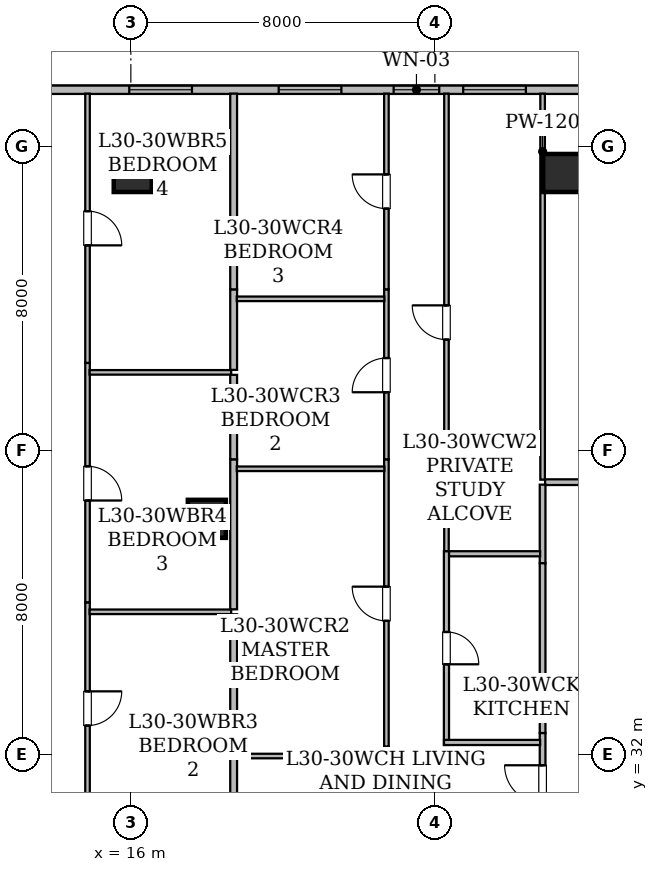
"""IFC4 building model, lengths in metres.
Left out: names, types, materials, properties, quantities, classifications, styles, units other than length and angle.
Written with IfcOpenShell. Run it as: python <this file> out.ifc"""

import sys

from ifc_helpers import new_model, si_unit, direction, frame, frame_2d, origin, origin_2d, place, context, subcontext, project, spatial, rectangle, hollow_rectangle, extrude, element, fill, save


model = new_model("IFC4")
c1 = context("Model", 3, precision=1e-05, world=origin(), true_north=direction((0.0, 1.0)))
c2 = subcontext(c1, "Body", "Model", "MODEL_VIEW")
j1 = project(units=[si_unit("LENGTHUNIT", "METRE"), si_unit("PLANEANGLEUNIT", "RADIAN")], contexts=[c1])
p1 = place(None, origin())
s1 = spatial("IfcSite", under=j1, at=p1, CompositionType="ELEMENT")
p2 = place(p1, origin())
s2 = spatial("IfcBuilding", under=s1, at=p2, CompositionType="ELEMENT")
p3 = place(p2, frame((0.0, 0.0, 120.15)))
s3 = spatial("IfcBuildingStorey", under=s2, at=p3, CompositionType="ELEMENT", Elevation=120.15)
for number, where, z_axis, x_axis in (
    (1, (16.05, 47.3, 0.0), (0.0, 0.0, 1.0), (1.0, 0.0, 0.0)),
    (2, (27.35, 47.3, 0.0), (0.0, 0.0, 1.0), (1.0, 0.0, 0.0)),
    (3, (18.0, 38.2, 0.0), (0.0, 0.0, 1.0), (1.0, 0.0, 0.0)),
):
    element("IfcColumn", number, at=place(p3, frame(where, z_axis=z_axis, x_axis=x_axis)), inside=s3, PredefinedType="COLUMN", context=c2, shape_type="SweptSolid", body=[
        extrude(hollow_rectangle(XDim=1.0, YDim=1.0, WallThickness=0.05, at=origin_2d()), origin(), (0.0, 0.0, 1.0), 3.65),
    ])
p4 = place(p3, frame((13.715, 49.49, 0.0), z_axis=(0.0, 0.0, 1.0), x_axis=(1.0, 0.0, 0.0)))
e4 = element("IfcWall", 4, at=p4, inside=s3, PredefinedType="STANDARD", context=c2, shape_type="SweptSolid", body=[
    extrude(rectangle(XDim=38.639, YDim=0.22, at=frame_2d((19.319, 0.0))), origin(), (0.0, 0.0, 1.0), 3.43),
])
p5 = place(p4, frame((16.16, 0.0, 0.85)))
e5 = element("IfcOpeningElement", 5, at=p5, cuts=e4, PredefinedType="OPENING", context=c2, shape_type="SweptSolid", body=[
    extrude(rectangle(XDim=1.65, YDim=1.55, at=frame_2d((0.825, 0.775))), frame((0.0, 0.12, 0.0), z_axis=(0.0, -1.0, 0.0), x_axis=(1.0, 0.0, 0.0)), (0.0, 0.0, 1.0), 0.24),
])
p6 = place(p4, frame((2.243, 0.0, 0.85)))
e6 = element("IfcOpeningElement", 6, at=p6, cuts=e4, PredefinedType="OPENING", context=c2, shape_type="SweptSolid", body=[
    extrude(rectangle(XDim=1.65, YDim=1.55, at=frame_2d((0.825, 0.775))), frame((0.0, 0.12, 0.0), z_axis=(0.0, -1.0, 0.0), x_axis=(1.0, 0.0, 0.0)), (0.0, 0.0, 1.0), 0.24),
])
p7 = place(p4, frame((11.03, 0.0, 0.85)))
e7 = element("IfcOpeningElement", 7, at=p7, cuts=e4, PredefinedType="OPENING", context=c2, shape_type="SweptSolid", body=[
    extrude(rectangle(XDim=1.65, YDim=1.55, at=frame_2d((0.825, 0.775))), frame((0.0, 0.12, 0.0), z_axis=(0.0, -1.0, 0.0), x_axis=(1.0, 0.0, 0.0)), (0.0, 0.0, 1.0), 0.24),
])
p8 = place(p4, frame((9.2, 0.0, 0.8)))
e8 = element("IfcOpeningElement", 8, at=p8, cuts=e4, PredefinedType="OPENING", context=c2, shape_type="SweptSolid", body=[
    extrude(rectangle(XDim=1.2, YDim=1.5, at=frame_2d((0.6, 0.75))), frame((0.0, 0.12, 0.0), z_axis=(0.0, -1.0, 0.0), x_axis=(1.0, 0.0, 0.0)), (0.0, 0.0, 1.0), 0.24),
])
p9 = place(p4, frame((6.175, 0.0, 0.85)))
e9 = element("IfcOpeningElement", 9, at=p9, cuts=e4, PredefinedType="OPENING", context=c2, shape_type="SweptSolid", body=[
    extrude(rectangle(XDim=1.65, YDim=1.55, at=frame_2d((0.825, 0.775))), frame((0.0, 0.12, 0.0), z_axis=(0.0, -1.0, 0.0), x_axis=(1.0, 0.0, 0.0)), (0.0, 0.0, 1.0), 0.24),
])
p10 = place(p4, frame((23.425, 0.0, 0.85)))
e10 = element("IfcOpeningElement", 10, at=p10, cuts=e4, PredefinedType="OPENING", context=c2, shape_type="SweptSolid", body=[
    extrude(rectangle(XDim=1.65, YDim=1.55, at=frame_2d((0.825, 0.775))), frame((0.0, 0.12, 0.0), z_axis=(0.0, -1.0, 0.0), x_axis=(1.0, 0.0, 0.0)), (0.0, 0.0, 1.0), 0.24),
])
p11 = place(p4, frame((30.23, 0.0, 0.85)))
e11 = element("IfcOpeningElement", 11, at=p11, cuts=e4, PredefinedType="OPENING", context=c2, shape_type="SweptSolid", body=[
    extrude(rectangle(XDim=1.65, YDim=1.55, at=frame_2d((0.825, 0.775))), frame((0.0, 0.12, 0.0), z_axis=(0.0, -1.0, 0.0), x_axis=(1.0, 0.0, 0.0)), (0.0, 0.0, 1.0), 0.24),
])
p12 = place(p4, frame((36.367, 0.0, 0.85)))
e12 = element("IfcOpeningElement", 12, at=p12, cuts=e4, PredefinedType="OPENING", context=c2, shape_type="SweptSolid", body=[
    extrude(rectangle(XDim=1.65, YDim=1.55, at=frame_2d((0.825, 0.775))), frame((0.0, 0.12, 0.0), z_axis=(0.0, -1.0, 0.0), x_axis=(1.0, 0.0, 0.0)), (0.0, 0.0, 1.0), 0.24),
])
p13 = place(p3, frame((26.9, 39.165, 0.0), z_axis=(0.0, 0.0, 1.0), x_axis=(1.0, 0.0, 0.0)))
e13 = element("IfcWall", 13, at=p13, inside=s3, PredefinedType="STANDARD", context=c2, shape_type="SweptSolid", body=[
    extrude(rectangle(XDim=7.914, YDim=0.15, at=frame_2d((3.957, 0.0))), origin(), (0.0, 0.0, 1.0), 2.647),
])
p14 = place(p13, frame((3.486, 0.0, 0.0)))
e14 = element("IfcOpeningElement", 14, at=p14, cuts=e13, PredefinedType="OPENING", context=c2, shape_type="SweptSolid", body=[
    extrude(rectangle(XDim=0.9, YDim=2.1, at=frame_2d((0.45, 1.05))), frame((0.0, 0.085, 0.0), z_axis=(0.0, -1.0, 0.0), x_axis=(1.0, 0.0, 0.0)), (0.0, 0.0, 1.0), 0.17),
])
p15 = place(p3, frame((26.835, 37.032, 0.0), z_axis=(0.0, 0.0, 1.0), x_axis=(0.0, 1.0, 0.0)))
e15 = element("IfcWall", 15, at=p15, inside=s3, PredefinedType="STANDARD", context=c2, shape_type="SweptSolid", body=[
    extrude(rectangle(XDim=2.068, YDim=0.15, at=frame_2d((1.034, 0.0))), origin(), (0.0, 0.0, 1.0), 2.647),
])
p16 = place(p3, frame((26.835, 29.867, 0.0), z_axis=(0.0, 0.0, 1.0), x_axis=(0.0, 1.0, 0.0)))
e16 = element("IfcWall", 16, at=p16, inside=s3, PredefinedType="STANDARD", context=c2, shape_type="SweptSolid", body=[
    extrude(rectangle(XDim=2.698, YDim=0.15, at=frame_2d((1.349, 0.0))), origin(), (0.0, 0.0, 1.0), 3.43),
])
p17 = place(p16, frame((0.849, 0.0, 0.0)))
e17 = element("IfcOpeningElement", 17, at=p17, cuts=e16, PredefinedType="OPENING", context=c2, shape_type="SweptSolid", body=[
    extrude(rectangle(XDim=1.0, YDim=2.15, at=frame_2d((0.5, 1.075))), frame((0.0, 0.085, 0.0), z_axis=(0.0, -1.0, 0.0), x_axis=(1.0, 0.0, 0.0)), (0.0, 0.0, 1.0), 0.17),
])
p18 = place(p3, frame((26.835, 32.565, 0.0), z_axis=(0.0, 0.0, 1.0), x_axis=(0.0, 1.0, 0.0)))
e18 = element("IfcWall", 18, at=p18, inside=s3, PredefinedType="STANDARD", context=c2, shape_type="SweptSolid", body=[
    extrude(rectangle(XDim=4.467, YDim=0.15, at=frame_2d((2.233, 0.0))), origin(), (0.0, 0.0, 1.0), 2.647),
])
p19 = place(p3, frame((26.835, 39.23, 0.0), z_axis=(0.0, 0.0, 1.0), x_axis=(0.0, 1.0, 0.0)))
e19 = element("IfcWall", 19, at=p19, inside=s3, PredefinedType="PARTITIONING", context=c2, shape_type="SweptSolid", body=[
    extrude(rectangle(XDim=10.158, YDim=0.12, at=frame_2d((5.079, 0.0))), origin(), (0.0, 0.0, 1.0), 2.876),
])
p20 = place(p3, frame((14.86, 36.003, 0.0), z_axis=(0.0, 0.0, 1.0), x_axis=(0.0, -1.0, 0.0)))
e20 = element("IfcWall", 20, at=p20, inside=s3, PredefinedType="PARTITIONING", context=c2, shape_type="SweptSolid", body=[
    extrude(rectangle(XDim=5.543, YDim=0.12, at=frame_2d((2.771, 0.0))), origin(), (0.0, 0.0, 1.0), 2.687),
])
p21 = place(p20, frame((2.342, 0.0, 0.0)))
e21 = element("IfcOpeningElement", 21, at=p21, cuts=e20, PredefinedType="OPENING", context=c2, shape_type="SweptSolid", body=[
    extrude(rectangle(XDim=0.9, YDim=2.1, at=frame_2d((0.45, 1.05))), frame((0.0, 0.07, 0.0), z_axis=(0.0, -1.0, 0.0), x_axis=(1.0, 0.0, 0.0)), (0.0, 0.0, 1.0), 0.14),
])
p22 = place(p3, frame((14.86, 42.303, 0.0), z_axis=(0.0, 0.0, 1.0), x_axis=(0.0, -1.0, 0.0)))
e22 = element("IfcWall", 22, at=p22, inside=s3, PredefinedType="PARTITIONING", context=c2, shape_type="SweptSolid", body=[
    extrude(rectangle(XDim=6.3, YDim=0.12, at=frame_2d((3.15, 0.0))), origin(), (0.0, 0.0, 1.0), 2.687),
])
p23 = place(p22, frame((2.721, 0.0, 0.0)))
e23 = element("IfcOpeningElement", 23, at=p23, cuts=e22, PredefinedType="OPENING", context=c2, shape_type="SweptSolid", body=[
    extrude(rectangle(XDim=0.9, YDim=2.1, at=frame_2d((0.45, 1.05))), frame((0.0, 0.07, 0.0), z_axis=(0.0, -1.0, 0.0), x_axis=(1.0, 0.0, 0.0)), (0.0, 0.0, 1.0), 0.14),
])
p24 = place(p3, frame((14.86, 49.388, 0.0), z_axis=(0.0, 0.0, 1.0), x_axis=(0.0, -1.0, 0.0)))
e24 = element("IfcWall", 24, at=p24, inside=s3, PredefinedType="PARTITIONING", context=c2, shape_type="SweptSolid", body=[
    extrude(rectangle(XDim=7.085, YDim=0.12, at=frame_2d((3.542, 0.0))), origin(), (0.0, 0.0, 1.0), 2.876),
])
p25 = place(p24, frame((3.092, 0.0, 0.0)))
e25 = element("IfcOpeningElement", 25, at=p25, cuts=e24, PredefinedType="OPENING", context=c2, shape_type="SweptSolid", body=[
    extrude(rectangle(XDim=0.9, YDim=2.1, at=frame_2d((0.45, 1.05))), frame((0.0, 0.07, 0.0), z_axis=(0.0, -1.0, 0.0), x_axis=(1.0, 0.0, 0.0)), (0.0, 0.0, 1.0), 0.14),
])
p26 = place(p3, frame((14.914, 35.754, 0.0), z_axis=(0.0, 0.0, 1.0), x_axis=(1.0, 0.0, 0.0)))
e26 = element("IfcWall", 26, at=p26, inside=s3, PredefinedType="PARTITIONING", context=c2, shape_type="SweptSolid", body=[
    extrude(rectangle(XDim=3.726, YDim=0.12, at=frame_2d((1.863, 0.0))), origin(), (0.0, 0.0, 1.0), 2.647),
])
p27 = place(p3, frame((18.705, 32.208, 0.0), z_axis=(0.0, 0.0, 1.0), x_axis=(0.0, -1.0, 0.0)))
e27 = element("IfcWall", 27, at=p27, inside=s3, PredefinedType="STANDARD", context=c2, shape_type="SweptSolid", body=[
    extrude(rectangle(XDim=1.618, YDim=0.18, at=frame_2d((0.809, 0.0))), origin(), (0.0, 0.0, 1.0), 3.43),
])
p28 = place(p3, frame((18.705, 35.689, 0.0), z_axis=(0.0, 0.0, 1.0), x_axis=(0.0, -1.0, 0.0)))
e28 = element("IfcWall", 28, at=p28, inside=s3, PredefinedType="STANDARD", context=c2, shape_type="SweptSolid", body=[
    extrude(rectangle(XDim=3.481, YDim=0.18, at=frame_2d((1.74, 0.0))), origin(), (0.0, 0.0, 1.0), 3.43),
])
p29 = place(p3, frame((14.914, 42.054, 0.0), z_axis=(0.0, 0.0, 1.0), x_axis=(1.0, 0.0, 0.0)))
e29 = element("IfcWall", 29, at=p29, inside=s3, PredefinedType="PARTITIONING", context=c2, shape_type="SweptSolid", body=[
    extrude(rectangle(XDim=3.726, YDim=0.12, at=frame_2d((1.863, 0.0))), origin(), (0.0, 0.0, 1.0), 2.647),
])
p30 = place(p3, frame((18.705, 39.766, 0.0), z_axis=(0.0, 0.0, 1.0), x_axis=(0.0, -1.0, 0.0)))
e30 = element("IfcWall", 30, at=p30, inside=s3, PredefinedType="STANDARD", context=c2, shape_type="SweptSolid", body=[
    extrude(rectangle(XDim=3.947, YDim=0.18, at=frame_2d((1.974, 0.0))), origin(), (0.0, 0.0, 1.0), 2.647),
])
p31 = place(p3, frame((18.705, 41.989, 0.0), z_axis=(0.0, 0.0, 1.0), x_axis=(0.0, -1.0, 0.0)))
e31 = element("IfcWall", 31, at=p31, inside=s3, PredefinedType="STANDARD", context=c2, shape_type="SweptSolid", body=[
    extrude(rectangle(XDim=2.223, YDim=0.18, at=frame_2d((1.111, 0.0))), origin(), (0.0, 0.0, 1.0), 3.43),
])
p32 = place(p3, frame((18.705, 44.238, 0.0), z_axis=(0.0, 0.0, 1.0), x_axis=(0.0, -1.0, 0.0)))
e32 = element("IfcWall", 32, at=p32, inside=s3, PredefinedType="STANDARD", context=c2, shape_type="SweptSolid", body=[
    extrude(rectangle(XDim=2.119, YDim=0.18, at=frame_2d((1.06, 0.0))), origin(), (0.0, 0.0, 1.0), 3.43),
])
p33 = place(p3, frame((18.705, 49.388, 0.0), z_axis=(0.0, 0.0, 1.0), x_axis=(0.0, -1.0, 0.0)))
e33 = element("IfcWall", 33, at=p33, inside=s3, PredefinedType="STANDARD", context=c2, shape_type="SweptSolid", body=[
    extrude(rectangle(XDim=5.15, YDim=0.18, at=frame_2d((2.575, 0.0))), origin(), (0.0, 0.0, 1.0), 2.876),
])
p34 = place(p3, frame((24.305, 37.346, 0.0), z_axis=(0.0, 0.0, 1.0), x_axis=(0.0, 1.0, 0.0)))
e34 = element("IfcWall", 34, at=p34, inside=s3, PredefinedType="PARTITIONING", context=c2, shape_type="SweptSolid", body=[
    extrude(rectangle(XDim=12.042, YDim=0.12, at=frame_2d((6.021, 0.0))), origin(), (0.0, 0.0, 1.0), 2.647),
])
p35 = place(p34, frame((5.571, 0.0, 0.0)))
e35 = element("IfcOpeningElement", 35, at=p35, cuts=e34, PredefinedType="OPENING", context=c2, shape_type="SweptSolid", body=[
    extrude(rectangle(XDim=0.9, YDim=2.1, at=frame_2d((0.45, 1.05))), frame((0.0, 0.07, 0.0), z_axis=(0.0, -1.0, 0.0), x_axis=(1.0, 0.0, 0.0)), (0.0, 0.0, 1.0), 0.14),
])
p36 = place(p3, frame((26.77, 37.281, 0.0), z_axis=(0.0, 0.0, 1.0), x_axis=(-1.0, 0.0, 0.0)))
e36 = element("IfcWall", 36, at=p36, inside=s3, PredefinedType="PARTITIONING", context=c2, shape_type="SweptSolid", body=[
    extrude(rectangle(XDim=2.4, YDim=0.135, at=frame_2d((1.2, 0.0))), origin(), (0.0, 0.0, 1.0), 2.647),
])
p37 = place(p3, frame((24.305, 37.346, 0.0), z_axis=(0.0, 0.0, 1.0), x_axis=(0.0, -1.0, 0.0)))
e37 = element("IfcWall", 37, at=p37, inside=s3, PredefinedType="PARTITIONING", context=c2, shape_type="SweptSolid", body=[
    extrude(rectangle(XDim=5.095, YDim=0.135, at=frame_2d((2.547, 0.0))), origin(), (0.0, 0.0, 1.0), 2.647),
])
p38 = place(p37, frame((2.123, 0.0, 0.0)))
e38 = element("IfcOpeningElement", 38, at=p38, cuts=e37, PredefinedType="OPENING", context=c2, shape_type="SweptSolid", body=[
    extrude(rectangle(XDim=0.85, YDim=2.1, at=frame_2d((0.425, 1.05))), frame((0.0, 0.077, 0.0), z_axis=(0.0, -1.0, 0.0), x_axis=(1.0, 0.0, 0.0)), (0.0, 0.0, 1.0), 0.155),
])
p39 = place(p3, frame((24.24, 32.316, 0.0), z_axis=(0.0, 0.0, 1.0), x_axis=(1.0, 0.0, 0.0)))
e39 = element("IfcWall", 39, at=p39, inside=s3, PredefinedType="PARTITIONING", context=c2, shape_type="SweptSolid", body=[
    extrude(rectangle(XDim=2.53, YDim=0.135, at=frame_2d((1.265, 0.0))), origin(), (0.0, 0.0, 1.0), 3.43),
])
p40 = place(p3, frame((22.725, 25.43, 0.0), z_axis=(0.0, 0.0, 1.0), x_axis=(0.0, 1.0, 0.0)))
e40 = element("IfcWall", 40, at=p40, inside=s3, PredefinedType="PARTITIONING", context=c2, shape_type="SweptSolid", body=[
    extrude(rectangle(XDim=6.778, YDim=0.12, at=frame_2d((3.389, 0.0))), origin(), (0.0, 0.0, 1.0), 3.013),
])
p41 = place(p40, frame((2.918, 0.0, 0.0)))
e41 = element("IfcOpeningElement", 41, at=p41, cuts=e40, PredefinedType="OPENING", context=c2, shape_type="SweptSolid", body=[
    extrude(rectangle(XDim=0.9, YDim=2.1, at=frame_2d((0.45, 1.05))), frame((0.0, 0.07, 0.0), z_axis=(0.0, -1.0, 0.0), x_axis=(1.0, 0.0, 0.0)), (0.0, 0.0, 1.0), 0.14),
])
p42 = place(p3, frame((22.725, 32.208, 0.0), z_axis=(0.0, 0.0, 1.0), x_axis=(0.0, 1.0, 0.0)))
e42 = element("IfcWall", 42, at=p42, inside=s3, PredefinedType="PARTITIONING", context=c2, shape_type="SweptSolid", body=[
    extrude(rectangle(XDim=7.558, YDim=0.12, at=frame_2d((3.779, 0.0))), origin(), (0.0, 0.0, 1.0), 2.647),
])
p43 = place(p42, frame((3.308, 0.0, 0.0)))
e43 = element("IfcOpeningElement", 43, at=p43, cuts=e42, PredefinedType="OPENING", context=c2, shape_type="SweptSolid", body=[
    extrude(rectangle(XDim=0.9, YDim=2.1, at=frame_2d((0.45, 1.05))), frame((0.0, 0.07, 0.0), z_axis=(0.0, -1.0, 0.0), x_axis=(1.0, 0.0, 0.0)), (0.0, 0.0, 1.0), 0.14),
])
p44 = place(p3, frame((22.725, 39.766, 0.0), z_axis=(0.0, 0.0, 1.0), x_axis=(0.0, 1.0, 0.0)))
e44 = element("IfcWall", 44, at=p44, inside=s3, PredefinedType="PARTITIONING", context=c2, shape_type="SweptSolid", body=[
    extrude(rectangle(XDim=4.472, YDim=0.12, at=frame_2d((2.236, 0.0))), origin(), (0.0, 0.0, 1.0), 3.43),
])
p45 = place(p44, frame((1.765, 0.0, 0.0)))
e45 = element("IfcOpeningElement", 45, at=p45, cuts=e44, PredefinedType="OPENING", context=c2, shape_type="SweptSolid", body=[
    extrude(rectangle(XDim=0.9, YDim=2.1, at=frame_2d((0.45, 1.05))), frame((0.0, 0.07, 0.0), z_axis=(0.0, -1.0, 0.0), x_axis=(1.0, 0.0, 0.0)), (0.0, 0.0, 1.0), 0.14),
])
p46 = place(p3, frame((22.725, 44.238, 0.0), z_axis=(0.0, 0.0, 1.0), x_axis=(0.0, 1.0, 0.0)))
e46 = element("IfcWall", 46, at=p46, inside=s3, PredefinedType="PARTITIONING", context=c2, shape_type="SweptSolid", body=[
    extrude(rectangle(XDim=5.15, YDim=0.12, at=frame_2d((2.575, 0.0))), origin(), (0.0, 0.0, 1.0), 2.876),
])
p47 = place(p46, frame((2.125, 0.0, 0.0)))
e47 = element("IfcOpeningElement", 47, at=p47, cuts=e46, PredefinedType="OPENING", context=c2, shape_type="SweptSolid", body=[
    extrude(rectangle(XDim=0.9, YDim=2.1, at=frame_2d((0.45, 1.05))), frame((0.0, 0.07, 0.0), z_axis=(0.0, -1.0, 0.0), x_axis=(1.0, 0.0, 0.0)), (0.0, 0.0, 1.0), 0.14),
])
for number, where, z_axis, x_axis in (
    (48, (18.787, 31.959, 0.0), (0.0, 0.0, 1.0), (1.0, 0.0, 0.0)),
    (49, (18.787, 39.517, 0.0), (0.0, 0.0, 1.0), (1.0, 0.0, 0.0)),
    (50, (18.787, 43.989, 0.0), (0.0, 0.0, 1.0), (1.0, 0.0, 0.0)),
):
    element("IfcWall", number, at=place(p3, frame(where, z_axis=z_axis, x_axis=x_axis)), inside=s3, PredefinedType="PARTITIONING", context=c2, shape_type="SweptSolid", body=[
        extrude(rectangle(XDim=3.884, YDim=0.12, at=frame_2d((1.942, 0.0))), origin(), (0.0, 0.0, 1.0), 3.43),
    ])
p48 = place(p6, origin())
e51 = element("IfcWindow", 51, at=p48, inside=s3, PartitioningType="SINGLE_PANEL", PredefinedType="WINDOW", context=c2, shape_type="SweptSolid", body=[
    extrude(rectangle(XDim=1.65, YDim=1.55, at=frame_2d((0.825, 0.775))), frame((0.0, 0.03, 0.0), z_axis=(0.0, -1.0, 0.0), x_axis=(1.0, 0.0, 0.0)), (0.0, 0.0, 1.0), 0.06),
])
fill(e6, e51)
p49 = place(p7, origin())
e52 = element("IfcWindow", 52, at=p49, inside=s3, PartitioningType="SINGLE_PANEL", PredefinedType="WINDOW", context=c2, shape_type="SweptSolid", body=[
    extrude(rectangle(XDim=1.65, YDim=1.55, at=frame_2d((0.825, 0.775))), frame((0.0, 0.03, 0.0), z_axis=(0.0, -1.0, 0.0), x_axis=(1.0, 0.0, 0.0)), (0.0, 0.0, 1.0), 0.06),
])
fill(e7, e52)
p50 = place(p8, origin())
e53 = element("IfcWindow", 53, at=p50, inside=s3, PartitioningType="SINGLE_PANEL", PredefinedType="WINDOW", context=c2, shape_type="SweptSolid", body=[
    extrude(rectangle(XDim=1.2, YDim=1.5, at=frame_2d((0.6, 0.75))), frame((0.0, 0.03, 0.0), z_axis=(0.0, -1.0, 0.0), x_axis=(1.0, 0.0, 0.0)), (0.0, 0.0, 1.0), 0.06),
])
fill(e8, e53)
p51 = place(p9, origin())
e54 = element("IfcWindow", 54, at=p51, inside=s3, PartitioningType="SINGLE_PANEL", PredefinedType="WINDOW", context=c2, shape_type="SweptSolid", body=[
    extrude(rectangle(XDim=1.65, YDim=1.55, at=frame_2d((0.825, 0.775))), frame((0.0, 0.03, 0.0), z_axis=(0.0, -1.0, 0.0), x_axis=(1.0, 0.0, 0.0)), (0.0, 0.0, 1.0), 0.06),
])
fill(e9, e54)
p52 = place(p17, origin())
e55 = element("IfcDoor", 55, at=p52, inside=s3, OperationType="SINGLE_SWING_RIGHT", PredefinedType="DOOR", context=c2, shape_type="SweptSolid", body=[
    extrude(rectangle(XDim=1.0, YDim=2.15, at=frame_2d((0.5, 1.075))), frame((0.0, 0.025, 0.0), z_axis=(0.0, -1.0, 0.0), x_axis=(1.0, 0.0, 0.0)), (0.0, 0.0, 1.0), 0.05),
])
fill(e17, e55)
p53 = place(p21, origin())
e56 = element("IfcDoor", 56, at=p53, inside=s3, OperationType="SINGLE_SWING_LEFT", PredefinedType="DOOR", context=c2, shape_type="SweptSolid", body=[
    extrude(rectangle(XDim=0.9, YDim=2.1, at=frame_2d((0.45, 1.05))), frame((0.0, 0.025, 0.0), z_axis=(0.0, -1.0, 0.0), x_axis=(1.0, 0.0, 0.0)), (0.0, 0.0, 1.0), 0.05),
])
fill(e21, e56)
p54 = place(p23, origin())
e57 = element("IfcDoor", 57, at=p54, inside=s3, OperationType="SINGLE_SWING_RIGHT", PredefinedType="DOOR", context=c2, shape_type="SweptSolid", body=[
    extrude(rectangle(XDim=0.9, YDim=2.1, at=frame_2d((0.45, 1.05))), frame((0.0, 0.025, 0.0), z_axis=(0.0, -1.0, 0.0), x_axis=(1.0, 0.0, 0.0)), (0.0, 0.0, 1.0), 0.05),
])
fill(e23, e57)
p55 = place(p25, origin())
e58 = element("IfcDoor", 58, at=p55, inside=s3, OperationType="SINGLE_SWING_RIGHT", PredefinedType="DOOR", context=c2, shape_type="SweptSolid", body=[
    extrude(rectangle(XDim=0.9, YDim=2.1, at=frame_2d((0.45, 1.05))), frame((0.0, 0.025, 0.0), z_axis=(0.0, -1.0, 0.0), x_axis=(1.0, 0.0, 0.0)), (0.0, 0.0, 1.0), 0.05),
])
fill(e25, e58)
p56 = place(p35, origin())
e59 = element("IfcDoor", 59, at=p56, inside=s3, OperationType="SINGLE_SWING_RIGHT", PredefinedType="DOOR", context=c2, shape_type="SweptSolid", body=[
    extrude(rectangle(XDim=0.9, YDim=2.1, at=frame_2d((0.45, 1.05))), frame((0.0, 0.025, 0.0), z_axis=(0.0, -1.0, 0.0), x_axis=(1.0, 0.0, 0.0)), (0.0, 0.0, 1.0), 0.05),
])
fill(e35, e59)
p57 = place(p38, origin())
e60 = element("IfcDoor", 60, at=p57, inside=s3, OperationType="SINGLE_SWING_RIGHT", PredefinedType="DOOR", context=c2, shape_type="SweptSolid", body=[
    extrude(rectangle(XDim=0.85, YDim=2.1, at=frame_2d((0.425, 1.05))), frame((0.0, 0.025, 0.0), z_axis=(0.0, -1.0, 0.0), x_axis=(1.0, 0.0, 0.0)), (0.0, 0.0, 1.0), 0.05),
])
fill(e38, e60)
p58 = place(p43, origin())
e61 = element("IfcDoor", 61, at=p58, inside=s3, OperationType="SINGLE_SWING_RIGHT", PredefinedType="DOOR", context=c2, shape_type="SweptSolid", body=[
    extrude(rectangle(XDim=0.9, YDim=2.1, at=frame_2d((0.45, 1.05))), frame((0.0, 0.025, 0.0), z_axis=(0.0, -1.0, 0.0), x_axis=(1.0, 0.0, 0.0)), (0.0, 0.0, 1.0), 0.05),
])
fill(e43, e61)
p59 = place(p45, origin())
e62 = element("IfcDoor", 62, at=p59, inside=s3, OperationType="SINGLE_SWING_LEFT", PredefinedType="DOOR", context=c2, shape_type="SweptSolid", body=[
    extrude(rectangle(XDim=0.9, YDim=2.1, at=frame_2d((0.45, 1.05))), frame((0.0, 0.025, 0.0), z_axis=(0.0, -1.0, 0.0), x_axis=(1.0, 0.0, 0.0)), (0.0, 0.0, 1.0), 0.05),
])
fill(e45, e62)
p60 = place(p47, origin())
e63 = element("IfcDoor", 63, at=p60, inside=s3, OperationType="SINGLE_SWING_RIGHT", PredefinedType="DOOR", context=c2, shape_type="SweptSolid", body=[
    extrude(rectangle(XDim=0.9, YDim=2.1, at=frame_2d((0.45, 1.05))), frame((0.0, 0.025, 0.0), z_axis=(0.0, -1.0, 0.0), x_axis=(1.0, 0.0, 0.0)), (0.0, 0.0, 1.0), 0.05),
])
fill(e47, e63)
save(model, sys.argv[1])
